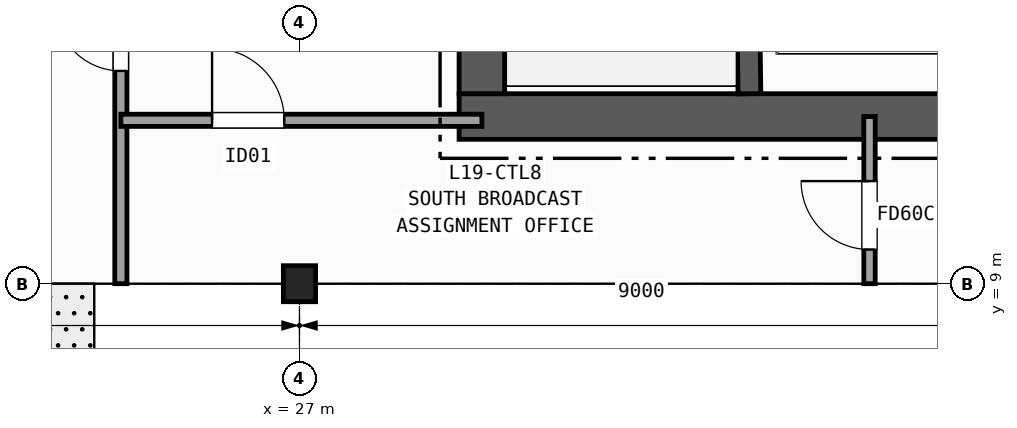
"""IFC4 building model, lengths in metres.
Left out: names, types, materials, properties, quantities, classifications, styles, units other than length and angle.
Written with IfcOpenShell. Run it as: python <this file> out.ifc"""

import sys

from ifc_helpers import new_model, si_unit, direction, frame, frame_2d, origin, origin_2d, place, context, subcontext, project, spatial, rectangle, i_section, extrude, element, fill, save


model = new_model("IFC4")
c1 = context("Model", 3, precision=1e-05, world=origin(), true_north=direction((0.0, 1.0)))
c2 = subcontext(c1, "Body", "Model", "MODEL_VIEW")
j1 = project(units=[si_unit("LENGTHUNIT", "METRE"), si_unit("PLANEANGLEUNIT", "RADIAN")], contexts=[c1])
p1 = place(None, origin())
s1 = spatial("IfcSite", under=j1, at=p1, CompositionType="ELEMENT")
p2 = place(p1, origin())
s2 = spatial("IfcBuilding", under=s1, at=p2, CompositionType="ELEMENT")
p3 = place(p2, frame((0.0, 0.0, 80.4)))
s3 = spatial("IfcBuildingStorey", under=s2, at=p3, CompositionType="ELEMENT", Elevation=80.4)
p4 = place(p3, frame((27.0, 9.0, 0.0), z_axis=(0.0, 0.0, 1.0), x_axis=(1.0, 0.0, 0.0)))
e1 = element("IfcColumn", 1, at=p4, inside=s3, PredefinedType="COLUMN", context=c2, shape_type="SweptSolid", body=[
    extrude(i_section(OverallWidth=0.424, OverallDepth=0.474, WebThickness=0.048, FlangeThickness=0.077, FilletRadius=0.015, at=origin_2d()), origin(), (0.0, 0.0, 1.0), 3.7),
])
p5 = place(p3, frame((29.1, 11.2, 0.0), z_axis=(0.0, 0.0, 1.0), x_axis=(1.0, 0.0, 0.0)))
e2 = element("IfcWall", 2, at=p5, inside=s3, PredefinedType="SHEAR", context=c2, shape_type="SweptSolid", body=[
    extrude(rectangle(XDim=14.0, YDim=0.6, at=frame_2d((7.0, 0.0))), origin(), (0.0, 0.0, 1.0), 3.37),
])
p6 = place(p3, frame((29.4, 24.3, 0.0), z_axis=(0.0, 0.0, 1.0), x_axis=(0.0, -1.0, 0.0)))
e3 = element("IfcWall", 3, at=p6, inside=s3, PredefinedType="SHEAR", context=c2, shape_type="SweptSolid", body=[
    extrude(rectangle(XDim=12.8, YDim=0.6, at=frame_2d((6.4, 0.0))), origin(), (0.0, 0.0, 1.0), 3.37),
])
p7 = place(p6, frame((1.4, 0.0, 0.0)))
e4 = element("IfcOpeningElement", 4, at=p7, cuts=e3, PredefinedType="OPENING", context=c2, shape_type="SweptSolid", body=[
    extrude(rectangle(XDim=1.35, YDim=2.15, at=frame_2d((0.675, 1.075))), frame((0.0, 0.31, 0.0), z_axis=(0.0, -1.0, 0.0), x_axis=(1.0, 0.0, 0.0)), (0.0, 0.0, 1.0), 0.62),
])
p8 = place(p3, frame((32.92, 11.5, 0.0), z_axis=(0.0, 0.0, 1.0), x_axis=(-0.013244407292, 0.999912288991, 0.0)))
e5 = element("IfcWall", 5, at=p8, inside=s3, PredefinedType="SHEAR", context=c2, shape_type="SweptSolid", body=[
    extrude(rectangle(XDim=9.051, YDim=0.3, at=frame_2d((4.525, 0.0))), origin(), (0.0, 0.0, 1.0), 3.37),
])
p9 = place(p3, frame((24.65, 9.0, 0.0), z_axis=(0.0, 0.0, 1.0), x_axis=(0.0, 1.0, 0.0)))
e6 = element("IfcWall", 6, at=p9, inside=s3, PredefinedType="PARTITIONING", context=c2, shape_type="SweptSolid", body=[
    extrude(rectangle(XDim=19.2, YDim=0.16, at=frame_2d((9.6, 0.0))), origin(), (0.0, 0.0, 1.0), 2.577),
])
p10 = place(p9, frame((2.8, 0.0, 0.0)))
e7 = element("IfcOpeningElement", 7, at=p10, cuts=e6, PredefinedType="OPENING", context=c2, shape_type="SweptSolid", body=[
    extrude(rectangle(XDim=0.86, YDim=2.05, at=frame_2d((0.43, 1.025))), frame((0.0, 0.09, 0.0), z_axis=(0.0, -1.0, 0.0), x_axis=(1.0, 0.0, 0.0)), (0.0, 0.0, 1.0), 0.18),
])
p11 = place(p9, frame((8.95, 0.0, 0.0)))
e8 = element("IfcOpeningElement", 8, at=p11, cuts=e6, PredefinedType="OPENING", context=c2, shape_type="SweptSolid", body=[
    extrude(rectangle(XDim=0.95, YDim=2.1, at=frame_2d((0.475, 1.05))), frame((0.0, 0.09, 0.0), z_axis=(0.0, -1.0, 0.0), x_axis=(1.0, 0.0, 0.0)), (0.0, 0.0, 1.0), 0.18),
])
p12 = place(p9, frame((13.44, 0.0, 0.0)))
e9 = element("IfcOpeningElement", 9, at=p12, cuts=e6, PredefinedType="OPENING", context=c2, shape_type="SweptSolid", body=[
    extrude(rectangle(XDim=1.0, YDim=2.1, at=frame_2d((0.5, 1.05))), frame((0.0, 0.09, 0.0), z_axis=(0.0, -1.0, 0.0), x_axis=(1.0, 0.0, 0.0)), (0.0, 0.0, 1.0), 0.18),
])
p13 = place(p3, frame((24.65, 11.15, 0.0), z_axis=(0.0, 0.0, 1.0), x_axis=(1.0, 0.0, 0.0)))
e10 = element("IfcWall", 10, at=p13, inside=s3, PredefinedType="PARTITIONING", context=c2, shape_type="SweptSolid", body=[
    extrude(rectangle(XDim=4.75, YDim=0.16, at=frame_2d((2.375, 0.0))), origin(), (0.0, 0.0, 1.0), 2.742),
])
p14 = place(p13, frame((1.2, 0.0, 0.0)))
e11 = element("IfcOpeningElement", 11, at=p14, cuts=e10, PredefinedType="OPENING", context=c2, shape_type="SweptSolid", body=[
    extrude(rectangle(XDim=0.95, YDim=2.1, at=frame_2d((0.475, 1.05))), frame((0.0, 0.09, 0.0), z_axis=(0.0, -1.0, 0.0), x_axis=(1.0, 0.0, 0.0)), (0.0, 0.0, 1.0), 0.18),
])
p15 = place(p3, frame((34.5, 9.0, 0.0), z_axis=(0.0, 0.0, 1.0), x_axis=(0.0, 1.0, 0.0)))
e12 = element("IfcWall", 12, at=p15, inside=s3, PredefinedType="PARTITIONING", context=c2, shape_type="SweptSolid", body=[
    extrude(rectangle(XDim=2.2, YDim=0.15, at=frame_2d((1.1, 0.0))), origin(), (0.0, 0.0, 1.0), 2.577),
])
p16 = place(p15, frame((0.45, 0.0, 0.0)))
e13 = element("IfcOpeningElement", 13, at=p16, cuts=e12, PredefinedType="OPENING", context=c2, shape_type="SweptSolid", body=[
    extrude(rectangle(XDim=0.9, YDim=2.1, at=frame_2d((0.45, 1.05))), frame((0.0, 0.085, 0.0), z_axis=(0.0, -1.0, 0.0), x_axis=(1.0, 0.0, 0.0)), (0.0, 0.0, 1.0), 0.17),
])
p17 = place(p10, origin())
e14 = element("IfcDoor", 14, at=p17, inside=s3, OperationType="SINGLE_SWING_RIGHT", PredefinedType="DOOR", context=c2, shape_type="SweptSolid", body=[
    extrude(rectangle(XDim=0.86, YDim=2.05, at=frame_2d((0.43, 1.025))), frame((0.0, 0.025, 0.0), z_axis=(0.0, -1.0, 0.0), x_axis=(1.0, 0.0, 0.0)), (0.0, 0.0, 1.0), 0.05),
])
fill(e7, e14)
p18 = place(p14, origin())
e15 = element("IfcDoor", 15, at=p18, inside=s3, OperationType="SINGLE_SWING_LEFT", PredefinedType="DOOR", context=c2, shape_type="SweptSolid", body=[
    extrude(rectangle(XDim=0.95, YDim=2.1, at=frame_2d((0.475, 1.05))), frame((0.0, 0.025, 0.0), z_axis=(0.0, -1.0, 0.0), x_axis=(1.0, 0.0, 0.0)), (0.0, 0.0, 1.0), 0.05),
])
fill(e11, e15)
p19 = place(p16, origin())
e16 = element("IfcDoor", 16, at=p19, inside=s3, OperationType="SINGLE_SWING_RIGHT", PredefinedType="DOOR", context=c2, shape_type="SweptSolid", body=[
    extrude(rectangle(XDim=0.9, YDim=2.1, at=frame_2d((0.45, 1.05))), frame((0.0, 0.025, 0.0), z_axis=(0.0, -1.0, 0.0), x_axis=(1.0, 0.0, 0.0)), (0.0, 0.0, 1.0), 0.05),
])
fill(e13, e16)
save(model, sys.argv[1])
